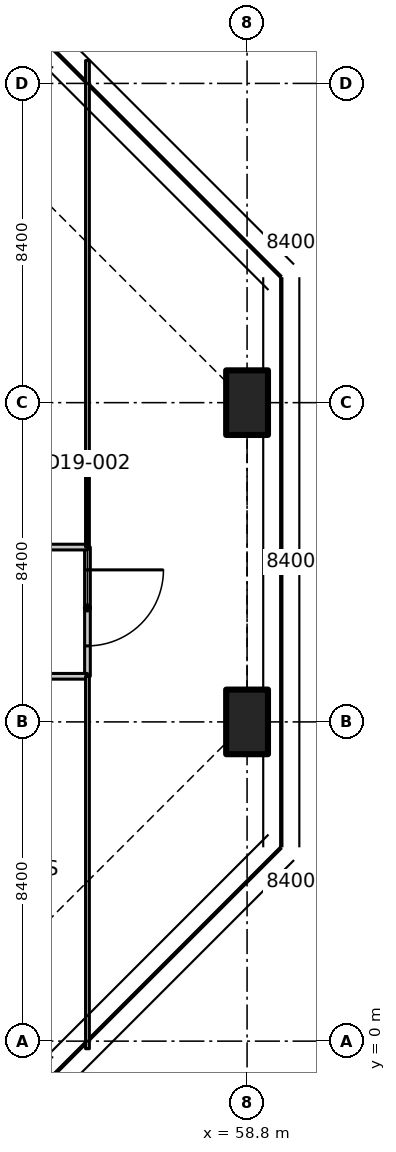
"""IFC4 building model, lengths in metres.
Left out: names, types, materials, properties, quantities, classifications, styles, units other than length and angle.
Written with IfcOpenShell. Run it as: python <this file> out.ifc"""

import sys

from ifc_helpers import new_model, si_unit, direction, frame, frame_2d, origin, origin_2d, place, context, subcontext, project, spatial, polyline, rectangle, outline, extrude, element, fill, save


model = new_model("IFC4")
c1 = context("Model", 3, precision=1e-05, world=origin(), true_north=direction((0.0, 1.0)))
c2 = subcontext(c1, "Body", "Model", "MODEL_VIEW")
j1 = project(units=[si_unit("LENGTHUNIT", "METRE"), si_unit("PLANEANGLEUNIT", "RADIAN")], contexts=[c1])
p1 = place(None, origin())
s1 = spatial("IfcSite", under=j1, at=p1, CompositionType="ELEMENT")
p2 = place(p1, origin())
s2 = spatial("IfcBuilding", under=s1, at=p2, CompositionType="ELEMENT")
p3 = place(p2, frame((0.0, 0.0, 156.5)))
s3 = spatial("IfcBuildingStorey", under=s2, at=p3, CompositionType="ELEMENT", Elevation=156.5)
for number, where, z_axis, x_axis in (
    (1, (58.8, 8.4, 0.0), (0.0, 0.0, 1.0), (1.0, 0.0, 0.0)),
    (2, (58.8, 16.8, 0.0), (0.0, 0.0, 1.0), (1.0, 0.0, 0.0)),
):
    element("IfcColumn", number, at=place(p3, frame(where, z_axis=z_axis, x_axis=x_axis)), inside=s3, PredefinedType="COLUMN", context=c2, shape_type="SweptSolid", body=[
        extrude(rectangle(XDim=1.1, YDim=1.7, at=origin_2d()), origin(), (0.0, 0.0, 1.0), 5.2),
    ])
p4 = place(p3, frame((54.6, 13.0, 0.0), z_axis=(0.0, 0.0, 1.0), x_axis=(0.0, -1.0, 0.0)))
e3 = element("IfcWall", 3, at=p4, inside=s3, PredefinedType="PARTITIONING", context=c2, shape_type="SweptSolid", body=[
    extrude(rectangle(XDim=3.4, YDim=0.15, at=frame_2d((1.7, 0.0))), origin(), (0.0, 0.0, 1.0), 5.18),
])
p5 = place(p4, frame((0.6, 0.0, 0.0)))
e4 = element("IfcOpeningElement", 4, at=p5, cuts=e3, PredefinedType="OPENING", context=c2, shape_type="SweptSolid", body=[
    extrude(rectangle(XDim=2.0, YDim=2.4, at=frame_2d((1.0, 1.2))), frame((0.0, 0.085, 0.0), z_axis=(0.0, -1.0, 0.0), x_axis=(1.0, 0.0, 0.0)), (0.0, 0.0, 1.0), 0.17),
])
p6 = place(p3, frame((54.6, 9.6, 0.0), z_axis=(0.0, 0.0, 1.0), x_axis=(-1.0, 0.0, 0.0)))
e5 = element("IfcWall", 5, at=p6, inside=s3, PredefinedType="PARTITIONING", context=c2, shape_type="SweptSolid", body=[
    extrude(rectangle(XDim=4.2, YDim=0.15, at=frame_2d((2.1, 0.0))), origin(), (0.0, 0.0, 1.0), 5.18),
])
p7 = place(p6, frame((1.5, 0.0, 0.0)))
e6 = element("IfcOpeningElement", 6, at=p7, cuts=e5, PredefinedType="OPENING", context=c2, shape_type="SweptSolid", body=[
    extrude(rectangle(XDim=1.1, YDim=2.1, at=frame_2d((0.55, 1.05))), frame((0.0, 0.085, 0.0), z_axis=(0.0, -1.0, 0.0), x_axis=(1.0, 0.0, 0.0)), (0.0, 0.0, 1.0), 0.17),
])
p8 = place(p3, frame((49.4, 13.0, 0.0), z_axis=(0.0, 0.0, 1.0), x_axis=(1.0, 0.0, 0.0)))
e7 = element("IfcWall", 7, at=p8, inside=s3, PredefinedType="PARTITIONING", context=c2, shape_type="SweptSolid", body=[
    extrude(rectangle(XDim=5.2, YDim=0.15, at=frame_2d((2.6, 0.0))), origin(), (0.0, 0.0, 1.0), 5.18),
])
p9 = place(p3, frame((54.6, -0.2, 0.0), z_axis=(0.0, 0.0, 1.0), x_axis=(0.0, 1.0, 0.0)))
e8 = element("IfcWall", 8, at=p9, inside=s3, PredefinedType="PARTITIONING", context=c2, shape_type="SweptSolid", body=[
    extrude(outline(polyline([(0.0, 0.0), (9.8, 0.0), (9.8, 5.18), (5.066, 5.18), (5.064, 4.83), (3.736, 4.83), (3.734, 5.18), (0.0, 5.18), (0.0, 0.0)])), frame((0.0, 0.05, 0.0), z_axis=(0.0, -1.0, 0.0), x_axis=(1.0, 0.0, 0.0)), (0.0, 0.0, 1.0), 0.1),
])
p10 = place(p3, frame((54.6, 13.0, 0.0), z_axis=(0.0, 0.0, 1.0), x_axis=(0.0, 1.0, 0.0)))
e9 = element("IfcWall", 9, at=p10, inside=s3, PredefinedType="PARTITIONING", context=c2, shape_type="SweptSolid", body=[
    extrude(outline(polyline([(0.0, 0.0), (12.801, 0.0), (12.801, 5.18), (12.4, 5.18), (8.666, 5.18), (8.664, 4.83), (7.336, 4.83), (7.334, 5.18), (0.0, 5.18), (0.0, 0.0)])), frame((0.0, 0.05, 0.0), z_axis=(0.0, -1.0, 0.0), x_axis=(1.0, 0.0, 0.0)), (0.0, 0.0, 1.0), 0.1),
])
p11 = place(p5, origin())
e10 = element("IfcDoor", 10, at=p11, inside=s3, OperationType="DOUBLE_DOOR_SINGLE_SWING", PredefinedType="DOOR", context=c2, shape_type="SweptSolid", body=[
    extrude(rectangle(XDim=2.0, YDim=2.4, at=frame_2d((1.0, 1.2))), frame((0.0, 0.025, 0.0), z_axis=(0.0, -1.0, 0.0), x_axis=(1.0, 0.0, 0.0)), (0.0, 0.0, 1.0), 0.05),
])
fill(e4, e10)
save(model, sys.argv[1])
